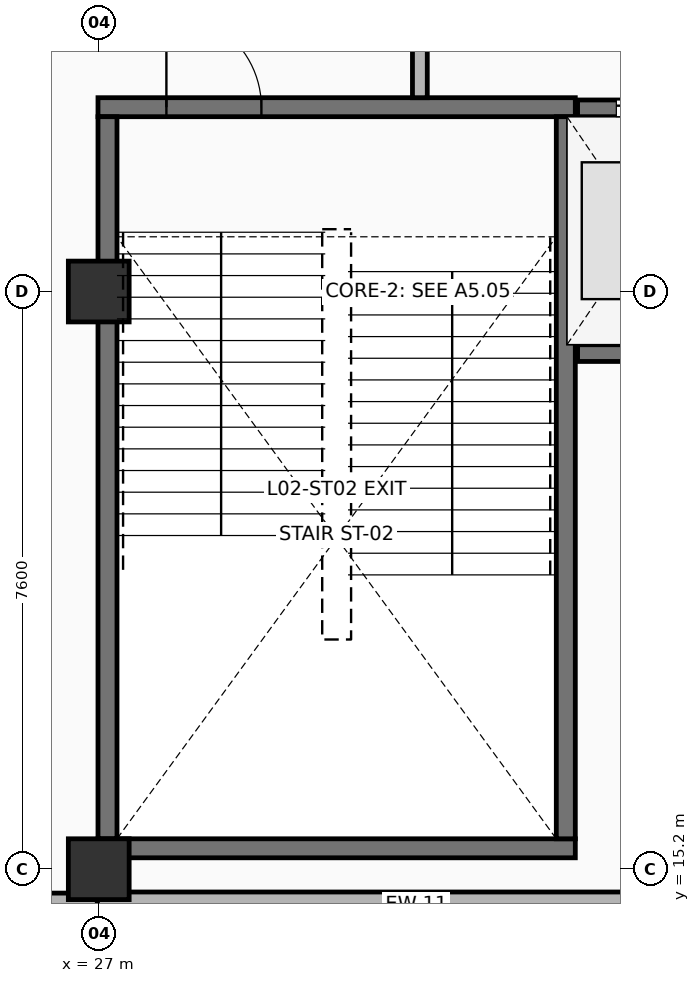
"""IFC4 building model, lengths in metres.
Left out: names, types, materials, properties, quantities, classifications, styles, units other than length and angle.
Written with IfcOpenShell. Run it as: python <this file> out.ifc"""

import sys

from ifc_helpers import new_model, si_unit, direction, frame, frame_2d, origin, origin_2d, place, context, subcontext, project, spatial, rectangle, extrude, element, fill, save


model = new_model("IFC4")
c1 = context("Model", 3, precision=1e-05, world=origin(), true_north=direction((0.0, 1.0)))
c2 = subcontext(c1, "Body", "Model", "MODEL_VIEW")
j1 = project(units=[si_unit("LENGTHUNIT", "METRE"), si_unit("PLANEANGLEUNIT", "RADIAN")], contexts=[c1])
p1 = place(None, origin())
s1 = spatial("IfcSite", under=j1, at=p1, CompositionType="ELEMENT")
p2 = place(p1, origin())
s2 = spatial("IfcBuilding", under=s1, at=p2, CompositionType="ELEMENT")
p3 = place(p2, frame((0.0, 0.0, 5.4)))
s3 = spatial("IfcBuildingStorey", under=s2, at=p3, CompositionType="ELEMENT", Elevation=5.4)
for number, where, z_axis, x_axis in (
    (1, (27.0, 15.2, 0.0), (0.0, 0.0, 1.0), (1.0, 0.0, 0.0)),
    (2, (27.0, 22.8, 0.0), (0.0, 0.0, 1.0), (1.0, 0.0, 0.0)),
):
    element("IfcColumn", number, at=place(p3, frame(where, z_axis=z_axis, x_axis=x_axis)), inside=s3, PredefinedType="COLUMN", context=c2, shape_type="SweptSolid", body=[
        extrude(rectangle(XDim=0.8, YDim=0.8, at=origin_2d()), origin(), (0.0, 0.0, 1.0), 5.1),
    ])
p4 = place(p3, frame((35.38, 14.73, 0.0), z_axis=(0.0, 0.0, 1.0), x_axis=(-1.0, 0.0, 0.0)))
e3 = element("IfcWall", 3, at=p4, inside=s3, PredefinedType="SOLIDWALL", context=c2, shape_type="SweptSolid", body=[
    extrude(rectangle(XDim=8.4, YDim=0.34, at=frame_2d((4.2, 0.0))), origin(), (0.0, 0.0, 1.0), 4.86),
])
p5 = place(p3, frame((26.98, 14.723, 0.0), z_axis=(0.0, 0.0, 1.0), x_axis=(-1.0, 0.0, 0.0)))
e4 = element("IfcWall", 4, at=p5, inside=s3, PredefinedType="SOLIDWALL", context=c2, shape_type="SweptSolid", body=[
    extrude(rectangle(XDim=8.74, YDim=0.325, at=frame_2d((4.37, 0.0))), origin(), (0.0, 0.0, 1.0), 4.86),
])
p6 = place(p3, frame((26.99, 15.475, 0.0), z_axis=(0.0, 0.0, 1.0), x_axis=(1.0, 0.0, 0.0)))
e5 = element("IfcWall", 5, at=p6, inside=s3, PredefinedType="SHEAR", context=c2, shape_type="SweptSolid", body=[
    extrude(rectangle(XDim=6.28, YDim=0.25, at=frame_2d((3.14, 0.0))), origin(), (0.0, 0.0, 1.0), 4.86),
])
p7 = place(p3, frame((26.99, 25.225, 0.0), z_axis=(0.0, 0.0, 1.0), x_axis=(1.0, 0.0, 0.0)))
e6 = element("IfcWall", 6, at=p7, inside=s3, PredefinedType="SHEAR", context=c2, shape_type="SweptSolid", body=[
    extrude(rectangle(XDim=6.28, YDim=0.25, at=frame_2d((3.14, 0.0))), origin(), (0.0, 0.0, 1.0), 4.86),
])
p8 = place(p7, frame((0.9, 0.0, 0.0)))
e7 = element("IfcOpeningElement", 7, at=p8, cuts=e6, PredefinedType="OPENING", context=c2, shape_type="SweptSolid", body=[
    extrude(rectangle(XDim=1.25, YDim=2.2, at=frame_2d((0.625, 1.1))), frame((0.0, 0.135, 0.0), z_axis=(0.0, -1.0, 0.0), x_axis=(1.0, 0.0, 0.0)), (0.0, 0.0, 1.0), 0.27),
])
for number, where, z_axis, x_axis in (
    (8, (27.115, 15.6, 0.0), (0.0, 0.0, 1.0), (0.0, 1.0, 0.0)),
    (9, (33.145, 15.6, 0.0), (0.0, 0.0, 1.0), (0.0, 1.0, 0.0)),
):
    element("IfcWall", number, at=place(p3, frame(where, z_axis=z_axis, x_axis=x_axis)), inside=s3, PredefinedType="SHEAR", context=c2, shape_type="SweptSolid", body=[
        extrude(rectangle(XDim=9.5, YDim=0.25, at=frame_2d((4.75, 0.0))), origin(), (0.0, 0.0, 1.0), 4.86),
    ])
p9 = place(p3, frame((33.3, 21.99, 0.0), z_axis=(0.0, 0.0, 1.0), x_axis=(1.0, 0.0, 0.0)))
e10 = element("IfcWall", 10, at=p9, inside=s3, PredefinedType="SHEAR", context=c2, shape_type="SweptSolid", body=[
    extrude(rectangle(XDim=2.12, YDim=0.22, at=frame_2d((1.06, 0.0))), origin(), (0.0, 0.0, 1.0), 4.86),
])
p10 = place(p3, frame((33.3, 25.21, 0.0), z_axis=(0.0, 0.0, 1.0), x_axis=(1.0, 0.0, 0.0)))
e11 = element("IfcWall", 11, at=p10, inside=s3, PredefinedType="SHEAR", context=c2, shape_type="SweptSolid", body=[
    extrude(rectangle(XDim=2.12, YDim=0.22, at=frame_2d((1.06, 0.0))), origin(), (0.0, 0.0, 1.0), 4.86),
])
p11 = place(p10, frame((0.51, 0.0, 0.0)))
e12 = element("IfcOpeningElement", 12, at=p11, cuts=e11, PredefinedType="OPENING", context=c2, shape_type="SweptSolid", body=[
    extrude(rectangle(XDim=1.1, YDim=2.15, at=frame_2d((0.55, 1.075))), frame((0.0, 0.12, 0.0), z_axis=(0.0, -1.0, 0.0), x_axis=(1.0, 0.0, 0.0)), (0.0, 0.0, 1.0), 0.24),
])
p12 = place(p3, frame((31.225, 25.35, 0.0), z_axis=(0.0, 0.0, 1.0), x_axis=(0.0, 1.0, 0.0)))
e13 = element("IfcWall", 13, at=p12, inside=s3, PredefinedType="PARTITIONING", context=c2, shape_type="SweptSolid", body=[
    extrude(rectangle(XDim=4.5, YDim=0.195, at=frame_2d((2.25, 0.0))), origin(), (0.0, 0.0, 1.0), 4.86),
])
p13 = place(p12, frame((1.7, 0.0, 0.0)))
e14 = element("IfcOpeningElement", 14, at=p13, cuts=e13, PredefinedType="OPENING", context=c2, shape_type="SweptSolid", body=[
    extrude(rectangle(XDim=1.1, YDim=2.15, at=frame_2d((0.55, 1.075))), frame((0.0, 0.107, 0.0), z_axis=(0.0, -1.0, 0.0), x_axis=(1.0, 0.0, 0.0)), (0.0, 0.0, 1.0), 0.215),
])
p14 = place(p8, origin())
e15 = element("IfcDoor", 15, at=p14, inside=s3, OperationType="SINGLE_SWING_LEFT", PredefinedType="DOOR", context=c2, shape_type="SweptSolid", body=[
    extrude(rectangle(XDim=1.25, YDim=2.2, at=frame_2d((0.625, 1.1))), frame((0.0, 0.025, 0.0), z_axis=(0.0, -1.0, 0.0), x_axis=(1.0, 0.0, 0.0)), (0.0, 0.0, 1.0), 0.05),
])
fill(e7, e15)
p15 = place(p11, origin())
e16 = element("IfcDoor", 16, at=p15, inside=s3, OperationType="DOUBLE_DOOR_SLIDING", PredefinedType="DOOR", context=c2, shape_type="SweptSolid", body=[
    extrude(rectangle(XDim=1.1, YDim=2.15, at=frame_2d((0.55, 1.075))), frame((0.0, 0.025, 0.0), z_axis=(0.0, -1.0, 0.0), x_axis=(1.0, 0.0, 0.0)), (0.0, 0.0, 1.0), 0.05),
])
fill(e12, e16)
save(model, sys.argv[1])
